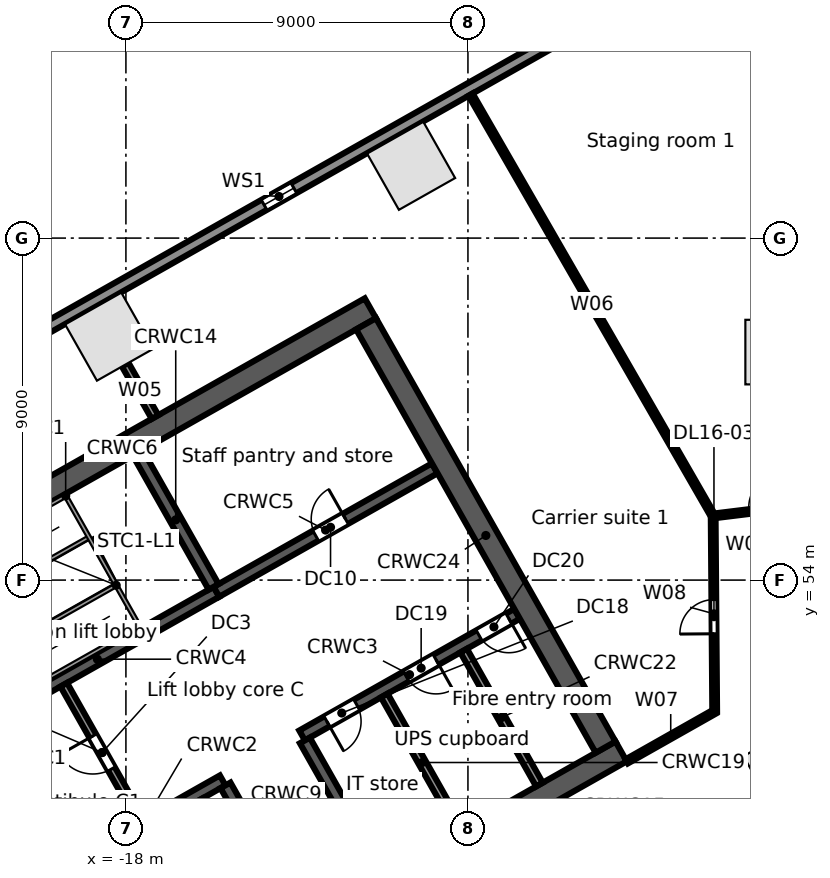
"""IFC4 building model, lengths in metres.
Left out: names, types, materials, properties, quantities, classifications, styles, units other than length and angle.
Written with IfcOpenShell. Run it as: python <this file> out.ifc"""

import sys

from ifc_helpers import new_model, si_unit, direction, frame, frame_2d, origin, origin_2d, place, context, subcontext, project, spatial, rectangle, extrude, element, fill, save


model = new_model("IFC4")
c1 = context("Model", 3, precision=1e-05, world=origin(), true_north=direction((0.0, 1.0)))
c2 = subcontext(c1, "Body", "Model", "MODEL_VIEW")
j1 = project(units=[si_unit("LENGTHUNIT", "METRE"), si_unit("PLANEANGLEUNIT", "RADIAN")], contexts=[c1])
p1 = place(None, origin())
s1 = spatial("IfcSite", under=j1, at=p1, CompositionType="ELEMENT")
p2 = place(p1, origin())
s2 = spatial("IfcBuilding", under=s1, at=p2, CompositionType="ELEMENT")
p3 = place(p2, frame((0.0, 0.0, 86.5)))
s3 = spatial("IfcBuildingStorey", under=s2, at=p3, CompositionType="ELEMENT", Elevation=86.5)
for number, where, z_axis, x_axis in (
    (1, (-10.495, 64.902, 0.0), (0.0, 0.0, 1.0), (-0.87, -0.492, 0.0)),
    (2, (-18.441, 60.406, 0.0), (0.0, 0.0, 1.0), (-0.87, -0.492, 0.0)),
    (3, (-0.591, 49.044, 0.0), (0.0, 0.0, 1.0), (0.87, 0.492, 0.0)),
    (4, (-0.85, 60.0, 0.0), (0.0, 0.0, 1.0), (0.0, 1.0, 0.0)),
):
    element("IfcColumn", number, at=place(p3, frame(where, z_axis=z_axis, x_axis=x_axis)), inside=s3, PredefinedType="COLUMN", context=c2, shape_type="SweptSolid", body=[
        extrude(rectangle(XDim=1.7, YDim=1.7, at=origin_2d()), origin(), (0.0, 0.0, 1.0), 5.0),
    ])
p4 = place(p3, frame((-58.745, 38.764, 0.0), z_axis=(0.0, 0.0, 1.0), x_axis=(0.870355811726, 0.492423355453, 0.0)))
e5 = element("IfcWall", 5, at=p4, inside=s3, PredefinedType="STANDARD", context=c2, shape_type="SweptSolid", body=[
    extrude(rectangle(XDim=64.025, YDim=0.3, at=frame_2d((32.013, 0.0))), origin(), (0.0, 0.0, 1.0), 4.65),
])
p5 = place(p4, frame((60.122, 0.0, 0.6)))
e6 = element("IfcOpeningElement", 6, at=p5, cuts=e5, PredefinedType="OPENING", context=c2, shape_type="SweptSolid", body=[
    extrude(rectangle(XDim=0.9, YDim=3.2, at=frame_2d((0.45, 1.6))), frame((0.0, 0.16, 0.0), z_axis=(0.0, -1.0, 0.0), x_axis=(1.0, 0.0, 0.0)), (0.0, 0.0, 1.0), 0.32),
])
p6 = place(p4, frame((50.992, 0.0, 0.6)))
e7 = element("IfcOpeningElement", 7, at=p6, cuts=e5, PredefinedType="OPENING", context=c2, shape_type="SweptSolid", body=[
    extrude(rectangle(XDim=0.9, YDim=3.2, at=frame_2d((0.45, 1.6))), frame((0.0, 0.16, 0.0), z_axis=(0.0, -1.0, 0.0), x_axis=(1.0, 0.0, 0.0)), (0.0, 0.0, 1.0), 0.32),
])
p7 = place(p4, frame((41.862, 0.0, 0.6)))
e8 = element("IfcOpeningElement", 8, at=p7, cuts=e5, PredefinedType="OPENING", context=c2, shape_type="SweptSolid", body=[
    extrude(rectangle(XDim=0.9, YDim=3.2, at=frame_2d((0.45, 1.6))), frame((0.0, 0.16, 0.0), z_axis=(0.0, -1.0, 0.0), x_axis=(1.0, 0.0, 0.0)), (0.0, 0.0, 1.0), 0.32),
])
p8 = place(p4, frame((32.732, 0.0, 0.6)))
e9 = element("IfcOpeningElement", 9, at=p8, cuts=e5, PredefinedType="OPENING", context=c2, shape_type="SweptSolid", body=[
    extrude(rectangle(XDim=0.9, YDim=3.2, at=frame_2d((0.45, 1.6))), frame((0.0, 0.16, 0.0), z_axis=(0.0, -1.0, 0.0), x_axis=(1.0, 0.0, 0.0)), (0.0, 0.0, 1.0), 0.32),
])
p9 = place(p4, frame((23.602, 0.0, 0.6)))
e10 = element("IfcOpeningElement", 10, at=p9, cuts=e5, PredefinedType="OPENING", context=c2, shape_type="SweptSolid", body=[
    extrude(rectangle(XDim=0.9, YDim=3.2, at=frame_2d((0.45, 1.6))), frame((0.0, 0.16, 0.0), z_axis=(0.0, -1.0, 0.0), x_axis=(1.0, 0.0, 0.0)), (0.0, 0.0, 1.0), 0.32),
])
p10 = place(p4, frame((14.472, 0.0, 0.6)))
e11 = element("IfcOpeningElement", 11, at=p10, cuts=e5, PredefinedType="OPENING", context=c2, shape_type="SweptSolid", body=[
    extrude(rectangle(XDim=0.9, YDim=3.2, at=frame_2d((0.45, 1.6))), frame((0.0, 0.16, 0.0), z_axis=(0.0, -1.0, 0.0), x_axis=(1.0, 0.0, 0.0)), (0.0, 0.0, 1.0), 0.32),
])
p11 = place(p4, frame((5.342, 0.0, 0.6)))
e12 = element("IfcOpeningElement", 12, at=p11, cuts=e5, PredefinedType="OPENING", context=c2, shape_type="SweptSolid", body=[
    extrude(rectangle(XDim=0.9, YDim=3.2, at=frame_2d((0.45, 1.6))), frame((0.0, 0.16, 0.0), z_axis=(0.0, -1.0, 0.0), x_axis=(1.0, 0.0, 0.0)), (0.0, 0.0, 1.0), 0.32),
])
p12 = place(p3, frame((-18.024, 42.104, 0.0), z_axis=(0.0, 0.0, 1.0), x_axis=(0.870360574057, 0.492414937962, 0.0)))
e13 = element("IfcWall", 13, at=p12, inside=s3, PredefinedType="SOLIDWALL", context=c2, shape_type="SweptSolid", body=[
    extrude(rectangle(XDim=15.0, YDim=0.6, at=frame_2d((7.5, 0.0))), origin(), (0.0, 0.0, 1.0), 4.65),
])
p13 = place(p12, frame((6.1, 0.0, 0.0)))
e14 = element("IfcOpeningElement", 14, at=p13, cuts=e13, PredefinedType="OPENING", context=c2, shape_type="SweptSolid", body=[
    extrude(rectangle(XDim=1.2, YDim=2.1, at=frame_2d((0.6, 1.05))), frame((0.0, 0.31, 0.0), z_axis=(0.0, -1.0, 0.0), x_axis=(1.0, 0.0, 0.0)), (0.0, 0.0, 1.0), 0.62),
])
p14 = place(p3, frame((-19.718, 46.316, 0.0), z_axis=(0.0, 0.0, 1.0), x_axis=(0.870353963862, 0.492426621528, 0.0)))
e15 = element("IfcWall", 15, at=p14, inside=s3, PredefinedType="SOLIDWALL", context=c2, shape_type="SweptSolid", body=[
    extrude(rectangle(XDim=4.9, YDim=0.3, at=frame_2d((2.45, 0.0))), origin(), (0.0, 0.0, 1.0), 4.65),
])
p15 = place(p14, frame((0.55, 0.0, 0.0)))
e16 = element("IfcOpeningElement", 16, at=p15, cuts=e15, PredefinedType="OPENING", context=c2, shape_type="SweptSolid", body=[
    extrude(rectangle(XDim=1.1, YDim=2.1, at=frame_2d((0.55, 1.05))), frame((0.0, 0.16, 0.0), z_axis=(0.0, -1.0, 0.0), x_axis=(1.0, 0.0, 0.0)), (0.0, 0.0, 1.0), 0.32),
])
p16 = place(p14, frame((2.85, 0.0, 0.0)))
e17 = element("IfcOpeningElement", 17, at=p16, cuts=e15, PredefinedType="OPENING", context=c2, shape_type="SweptSolid", body=[
    extrude(rectangle(XDim=0.9, YDim=2.1, at=frame_2d((0.45, 1.05))), frame((0.0, 0.16, 0.0), z_axis=(0.0, -1.0, 0.0), x_axis=(1.0, 0.0, 0.0)), (0.0, 0.0, 1.0), 0.32),
])
p17 = place(p3, frame((-13.365, 49.911, 0.0), z_axis=(0.0, 0.0, 1.0), x_axis=(0.870340995471, 0.49244954219, 0.0)))
e18 = element("IfcWall", 18, at=p17, inside=s3, PredefinedType="SOLIDWALL", context=c2, shape_type="SweptSolid", body=[
    extrude(rectangle(XDim=6.5, YDim=0.3, at=frame_2d((3.25, 0.0))), origin(), (0.0, 0.0, 1.0), 4.65),
])
p18 = place(p17, frame((0.75, 0.0, 0.0)))
e19 = element("IfcOpeningElement", 19, at=p18, cuts=e18, PredefinedType="OPENING", context=c2, shape_type="SweptSolid", body=[
    extrude(rectangle(XDim=0.9, YDim=2.1, at=frame_2d((0.45, 1.05))), frame((0.0, 0.16, 0.0), z_axis=(0.0, -1.0, 0.0), x_axis=(1.0, 0.0, 0.0)), (0.0, 0.0, 1.0), 0.32),
])
p19 = place(p17, frame((3.15, 0.0, 0.0)))
e20 = element("IfcOpeningElement", 20, at=p19, cuts=e18, PredefinedType="OPENING", context=c2, shape_type="SweptSolid", body=[
    extrude(rectangle(XDim=0.9, YDim=2.1, at=frame_2d((0.45, 1.05))), frame((0.0, 0.16, 0.0), z_axis=(0.0, -1.0, 0.0), x_axis=(1.0, 0.0, 0.0)), (0.0, 0.0, 1.0), 0.32),
])
p20 = place(p17, frame((5.35, 0.0, 0.0)))
e21 = element("IfcOpeningElement", 21, at=p20, cuts=e18, PredefinedType="OPENING", context=c2, shape_type="SweptSolid", body=[
    extrude(rectangle(XDim=0.9, YDim=2.1, at=frame_2d((0.45, 1.05))), frame((0.0, 0.16, 0.0), z_axis=(0.0, -1.0, 0.0), x_axis=(1.0, 0.0, 0.0)), (0.0, 0.0, 1.0), 0.32),
])
p21 = place(p3, frame((-21.885, 50.146, 0.0), z_axis=(0.0, 0.0, 1.0), x_axis=(0.870359411463, 0.492416992881, 0.0)))
e22 = element("IfcWall", 22, at=p21, inside=s3, PredefinedType="SOLIDWALL", context=c2, shape_type="SweptSolid", body=[
    extrude(rectangle(XDim=7.2, YDim=0.3, at=frame_2d((3.6, 0.0))), origin(), (0.0, 0.0, 1.0), 4.65),
])
p22 = place(p21, frame((0.2, 0.0, 0.0)))
e23 = element("IfcOpeningElement", 23, at=p22, cuts=e22, PredefinedType="OPENING", context=c2, shape_type="SweptSolid", body=[
    extrude(rectangle(XDim=1.0, YDim=2.1, at=frame_2d((0.5, 1.05))), frame((0.0, 0.16, 0.0), z_axis=(0.0, -1.0, 0.0), x_axis=(1.0, 0.0, 0.0)), (0.0, 0.0, 1.0), 0.32),
])
p23 = place(p3, frame((-15.618, 53.691, 0.0), z_axis=(0.0, 0.0, 1.0), x_axis=(0.870356769198, 0.492421663121, 0.0)))
e24 = element("IfcWall", 24, at=p23, inside=s3, PredefinedType="SOLIDWALL", context=c2, shape_type="SweptSolid", body=[
    extrude(rectangle(XDim=6.6, YDim=0.3, at=frame_2d((3.3, 0.0))), origin(), (0.0, 0.0, 1.0), 4.65),
])
p24 = place(p23, frame((3.0, 0.0, 0.0)))
e25 = element("IfcOpeningElement", 25, at=p24, cuts=e24, PredefinedType="OPENING", context=c2, shape_type="SweptSolid", body=[
    extrude(rectangle(XDim=0.9, YDim=2.1, at=frame_2d((0.45, 1.05))), frame((0.0, 0.16, 0.0), z_axis=(0.0, -1.0, 0.0), x_axis=(1.0, 0.0, 0.0)), (0.0, 0.0, 1.0), 0.32),
])
p25 = place(p3, frame((-24.623, 53.767, 0.0), z_axis=(0.0, 0.0, 1.0), x_axis=(0.870356627484, 0.492421913601, 0.0)))
e26 = element("IfcWall", 26, at=p25, inside=s3, PredefinedType="SOLIDWALL", context=c2, shape_type="SweptSolid", body=[
    extrude(rectangle(XDim=15.0, YDim=0.6, at=frame_2d((7.5, 0.0))), origin(), (0.0, 0.0, 1.0), 4.65),
])
p26 = place(p3, frame((-24.214, 53.654, 0.0), z_axis=(0.0, 0.0, 1.0), x_axis=(0.492441221355, -0.870345703448, 0.0)))
e27 = element("IfcWall", 27, at=p26, inside=s3, PredefinedType="SOLIDWALL", context=c2, shape_type="SweptSolid", body=[
    extrude(rectangle(XDim=12.8, YDim=0.6, at=frame_2d((6.4, 0.0))), origin(), (0.0, 0.0, 1.0), 4.65),
])
p27 = place(p3, frame((-19.635, 51.246, 0.0), z_axis=(0.0, 0.0, 1.0), x_axis=(0.492408451753, -0.87036424366, 0.0)))
e28 = element("IfcWall", 28, at=p27, inside=s3, PredefinedType="PARTITIONING", context=c2, shape_type="SweptSolid", body=[
    extrude(rectangle(XDim=4.1, YDim=0.2, at=frame_2d((2.05, 0.0))), origin(), (0.0, 0.0, 1.0), 4.65),
])
p28 = place(p27, frame((1.55, 0.0, 0.0)))
e29 = element("IfcOpeningElement", 29, at=p28, cuts=e28, PredefinedType="OPENING", context=c2, shape_type="SweptSolid", body=[
    extrude(rectangle(XDim=1.0, YDim=2.1, at=frame_2d((0.5, 1.05))), frame((0.0, 0.11, 0.0), z_axis=(0.0, -1.0, 0.0), x_axis=(1.0, 0.0, 0.0)), (0.0, 0.0, 1.0), 0.22),
])
p29 = place(p3, frame((-15.379, 48.599, 0.0), z_axis=(0.0, 0.0, 1.0), x_axis=(0.492394910396, -0.870371904542, 0.0)))
e30 = element("IfcWall", 30, at=p29, inside=s3, PredefinedType="SOLIDWALL", context=c2, shape_type="SweptSolid", body=[
    extrude(rectangle(XDim=4.05, YDim=0.3, at=frame_2d((2.025, 0.0))), origin(), (0.0, 0.0, 1.0), 4.65),
])
p30 = place(p3, frame((-17.686, 57.347, 0.0), z_axis=(0.0, 0.0, 1.0), x_axis=(0.492420746998, -0.870357287513, 0.0)))
e31 = element("IfcWall", 31, at=p30, inside=s3, PredefinedType="SOLIDWALL", context=c2, shape_type="SweptSolid", body=[
    extrude(rectangle(XDim=4.05, YDim=0.3, at=frame_2d((2.025, 0.0))), origin(), (0.0, 0.0, 1.0), 4.65),
])
p31 = place(p3, frame((-13.291, 49.781, 0.0), z_axis=(0.0, 0.0, 1.0), x_axis=(0.492394910396, -0.870371904542, 0.0)))
e32 = element("IfcWall", 32, at=p31, inside=s3, PredefinedType="SOLIDWALL", context=c2, shape_type="SweptSolid", body=[
    extrude(rectangle(XDim=4.05, YDim=0.3, at=frame_2d((2.025, 0.0))), origin(), (0.0, 0.0, 1.0), 4.65),
])
p32 = place(p3, frame((-11.202, 50.962, 0.0), z_axis=(0.0, 0.0, 1.0), x_axis=(0.49241474071, -0.870360685654, 0.0)))
e33 = element("IfcWall", 33, at=p32, inside=s3, PredefinedType="PARTITIONING", context=c2, shape_type="SweptSolid", body=[
    extrude(rectangle(XDim=4.05, YDim=0.2, at=frame_2d((2.025, 0.0))), origin(), (0.0, 0.0, 1.0), 4.65),
])
p33 = place(p3, frame((-9.113, 52.144, 0.0), z_axis=(0.0, 0.0, 1.0), x_axis=(0.492394910396, -0.870371904542, 0.0)))
e34 = element("IfcWall", 34, at=p33, inside=s3, PredefinedType="PARTITIONING", context=c2, shape_type="SweptSolid", body=[
    extrude(rectangle(XDim=4.05, YDim=0.2, at=frame_2d((2.025, 0.0))), origin(), (0.0, 0.0, 1.0), 4.65),
])
p34 = place(p3, frame((-11.681, 60.744, 0.0), z_axis=(0.0, 0.0, 1.0), x_axis=(0.492426772896, -0.870353878221, 0.0)))
e35 = element("IfcWall", 35, at=p34, inside=s3, PredefinedType="SOLIDWALL", context=c2, shape_type="SweptSolid", body=[
    extrude(rectangle(XDim=12.8, YDim=0.6, at=frame_2d((6.4, 0.0))), origin(), (0.0, 0.0, 1.0), 4.65),
])
p35 = place(p3, frame((-18.018, 59.669, 0.0), z_axis=(0.0, 0.0, 1.0), x_axis=(0.494877399769, -0.868962806568, 0.0)))
e36 = element("IfcWall", 36, at=p35, inside=s3, PredefinedType="PARTITIONING", context=c2, shape_type="SweptSolid", body=[
    extrude(rectangle(XDim=1.584, YDim=0.2, at=frame_2d((0.792, 0.0))), origin(), (0.0, 0.0, 1.0), 3.83),
])
p36 = place(p3, frame((-8.931, 66.775, 0.0), z_axis=(0.0, 0.0, 1.0), x_axis=(0.498955759248, -0.866627457627, 0.0)))
e37 = element("IfcWall", 37, at=p36, inside=s3, PredefinedType="PARTITIONING", context=c2, shape_type="SweptSolid", body=[
    extrude(rectangle(XDim=12.794, YDim=0.125, at=frame_2d((6.397, 0.0))), origin(), (0.0, 0.0, 1.0), 3.822),
])
p37 = place(p3, frame((-4.821, 49.23, 0.0), z_axis=(0.0, 0.0, 1.0), x_axis=(0.870371217631, 0.492396124598, 0.0)))
e38 = element("IfcWall", 38, at=p37, inside=s3, PredefinedType="PARTITIONING", context=c2, shape_type="SweptSolid", body=[
    extrude(rectangle(XDim=2.659, YDim=0.125, at=frame_2d((1.329, 0.0))), origin(), (0.0, 0.0, 1.0), 4.65),
])
p38 = place(p3, frame((-2.547, 55.687, 0.0), z_axis=(0.0, 0.0, 1.0), x_axis=(0.007777437156, -0.999969755278, 0.0)))
e39 = element("IfcWall", 39, at=p38, inside=s3, PredefinedType="PARTITIONING", context=c2, shape_type="SweptSolid", body=[
    extrude(rectangle(XDim=5.148, YDim=0.125, at=frame_2d((2.574, 0.0))), origin(), (0.0, 0.0, 1.0), 3.822),
])
p39 = place(p38, frame((2.2, 0.0, 0.0)))
e40 = element("IfcOpeningElement", 40, at=p39, cuts=e39, PredefinedType="OPENING", context=c2, shape_type="SweptSolid", body=[
    extrude(rectangle(XDim=0.9, YDim=2.1, at=frame_2d((0.45, 1.05))), frame((0.0, 0.073, 0.0), z_axis=(0.0, -1.0, 0.0), x_axis=(1.0, 0.0, 0.0)), (0.0, 0.0, 1.0), 0.145),
])
p40 = place(p3, frame((-2.547, 55.687, 0.0), z_axis=(0.0, 0.0, 1.0), x_axis=(0.992534770107, 0.121962002806, 0.0)))
e41 = element("IfcWall", 41, at=p40, inside=s3, PredefinedType="PARTITIONING", context=c2, shape_type="SweptSolid", body=[
    extrude(rectangle(XDim=2.566, YDim=0.125, at=frame_2d((1.283, 0.0))), origin(), (0.0, 0.0, 1.0), 4.65),
])
p41 = place(p40, frame((0.95, 0.0, 0.0)))
e42 = element("IfcOpeningElement", 42, at=p41, cuts=e41, PredefinedType="OPENING", context=c2, shape_type="SweptSolid", body=[
    extrude(rectangle(XDim=0.9, YDim=2.1, at=frame_2d((0.45, 1.05))), frame((0.0, 0.073, 0.0), z_axis=(0.0, -1.0, 0.0), x_axis=(1.0, 0.0, 0.0)), (0.0, 0.0, 1.0), 0.145),
])
p42 = place(p6, origin())
e43 = element("IfcWindow", 43, at=p42, inside=s3, PartitioningType="SINGLE_PANEL", PredefinedType="WINDOW", context=c2, shape_type="SweptSolid", body=[
    extrude(rectangle(XDim=0.9, YDim=3.2, at=frame_2d((0.45, 1.6))), frame((0.0, 0.03, 0.0), z_axis=(0.0, -1.0, 0.0), x_axis=(1.0, 0.0, 0.0)), (0.0, 0.0, 1.0), 0.06),
])
fill(e7, e43)
p43 = place(p28, frame((1.0, 0.0, 0.0), z_axis=(0.0, 0.0, 1.0), x_axis=(-1.0, 0.0, 0.0)))
e44 = element("IfcDoor", 44, at=p43, inside=s3, OperationType="SINGLE_SWING_RIGHT", PredefinedType="DOOR", context=c2, shape_type="SweptSolid", body=[
    extrude(rectangle(XDim=1.0, YDim=2.1, at=frame_2d((0.5, 1.05))), frame((0.0, 0.025, 0.0), z_axis=(0.0, -1.0, 0.0), x_axis=(1.0, 0.0, 0.0)), (0.0, 0.0, 1.0), 0.05),
])
fill(e29, e44)
p44 = place(p24, origin())
e45 = element("IfcDoor", 45, at=p44, inside=s3, OperationType="SINGLE_SWING_RIGHT", PredefinedType="DOOR", context=c2, shape_type="SweptSolid", body=[
    extrude(rectangle(XDim=0.9, YDim=2.1, at=frame_2d((0.45, 1.05))), frame((0.0, 0.025, 0.0), z_axis=(0.0, -1.0, 0.0), x_axis=(1.0, 0.0, 0.0)), (0.0, 0.0, 1.0), 0.05),
])
fill(e25, e45)
p45 = place(p18, frame((0.9, 0.0, 0.0), z_axis=(0.0, 0.0, 1.0), x_axis=(-1.0, 0.0, 0.0)))
e46 = element("IfcDoor", 46, at=p45, inside=s3, OperationType="SINGLE_SWING_RIGHT", PredefinedType="DOOR", context=c2, shape_type="SweptSolid", body=[
    extrude(rectangle(XDim=0.9, YDim=2.1, at=frame_2d((0.45, 1.05))), frame((0.0, 0.025, 0.0), z_axis=(0.0, -1.0, 0.0), x_axis=(1.0, 0.0, 0.0)), (0.0, 0.0, 1.0), 0.05),
])
fill(e19, e46)
p46 = place(p19, frame((0.9, 0.0, 0.0), z_axis=(0.0, 0.0, 1.0), x_axis=(-1.0, 0.0, 0.0)))
e47 = element("IfcDoor", 47, at=p46, inside=s3, OperationType="SINGLE_SWING_LEFT", PredefinedType="DOOR", context=c2, shape_type="SweptSolid", body=[
    extrude(rectangle(XDim=0.9, YDim=2.1, at=frame_2d((0.45, 1.05))), frame((0.0, 0.025, 0.0), z_axis=(0.0, -1.0, 0.0), x_axis=(1.0, 0.0, 0.0)), (0.0, 0.0, 1.0), 0.05),
])
fill(e20, e47)
p47 = place(p20, frame((0.9, 0.0, 0.0), z_axis=(0.0, 0.0, 1.0), x_axis=(-1.0, 0.0, 0.0)))
e48 = element("IfcDoor", 48, at=p47, inside=s3, OperationType="SINGLE_SWING_LEFT", PredefinedType="DOOR", context=c2, shape_type="SweptSolid", body=[
    extrude(rectangle(XDim=0.9, YDim=2.1, at=frame_2d((0.45, 1.05))), frame((0.0, 0.025, 0.0), z_axis=(0.0, -1.0, 0.0), x_axis=(1.0, 0.0, 0.0)), (0.0, 0.0, 1.0), 0.05),
])
fill(e21, e48)
p48 = place(p39, frame((0.9, 0.0, 0.0), z_axis=(0.0, 0.0, 1.0), x_axis=(-1.0, 0.0, 0.0)))
e49 = element("IfcDoor", 49, at=p48, inside=s3, OperationType="SINGLE_SWING_LEFT", PredefinedType="DOOR", context=c2, shape_type="SweptSolid", body=[
    extrude(rectangle(XDim=0.9, YDim=2.1, at=frame_2d((0.45, 1.05))), frame((0.0, 0.025, 0.0), z_axis=(0.0, -1.0, 0.0), x_axis=(1.0, 0.0, 0.0)), (0.0, 0.0, 1.0), 0.05),
])
fill(e40, e49)
p49 = place(p41, origin())
e50 = element("IfcDoor", 50, at=p49, inside=s3, OperationType="SINGLE_SWING_RIGHT", PredefinedType="DOOR", context=c2, shape_type="SweptSolid", body=[
    extrude(rectangle(XDim=0.9, YDim=2.1, at=frame_2d((0.45, 1.05))), frame((0.0, 0.025, 0.0), z_axis=(0.0, -1.0, 0.0), x_axis=(1.0, 0.0, 0.0)), (0.0, 0.0, 1.0), 0.05),
])
fill(e42, e50)
save(model, sys.argv[1])
